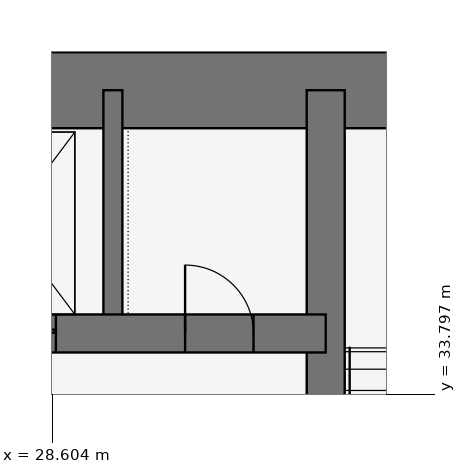
"""IFC4 building model, lengths in metres.
Left out: names, types, materials, properties, quantities, classifications, styles, units other than length and angle.
Written with IfcOpenShell. Run it as: python <this file> out.ifc"""

import sys

from ifc_helpers import new_model, si_unit, direction, frame, frame_2d, origin, place, context, subcontext, project, spatial, rectangle, extrude, element, fill, save


model = new_model("IFC4")
c1 = context("Model", 3, precision=1e-05, world=origin(), true_north=direction((0.0, 1.0)))
c2 = subcontext(c1, "Body", "Model", "MODEL_VIEW")
j1 = project(units=[si_unit("LENGTHUNIT", "METRE"), si_unit("PLANEANGLEUNIT", "RADIAN")], contexts=[c1])
p1 = place(None, origin())
s1 = spatial("IfcSite", under=j1, at=p1, CompositionType="ELEMENT")
p2 = place(p1, origin())
s2 = spatial("IfcBuilding", under=s1, at=p2, CompositionType="ELEMENT")
p3 = place(p2, frame((0.0, 0.0, 15.0)))
s3 = spatial("IfcBuildingStorey", under=s2, at=p3, CompositionType="ELEMENT", Elevation=15.0)
p4 = place(p3, frame((37.8, 37.8, 0.0), z_axis=(0.0, 0.0, 1.0), x_axis=(-1.0, 0.0, 0.0)))
e1 = element("IfcWall", 1, at=p4, inside=s3, PredefinedType="SHEAR", context=c2, shape_type="SweptSolid", body=[
    extrude(rectangle(XDim=17.3, YDim=1.0, at=frame_2d((8.65, 0.0))), origin(), (0.0, 0.0, 1.0), 4.5),
])
p5 = place(p3, frame((21.0, 34.6, 0.0), z_axis=(0.0, 0.0, 1.0), x_axis=(1.0, 0.0, 0.0)))
e2 = element("IfcWall", 2, at=p5, inside=s3, PredefinedType="SHEAR", context=c2, shape_type="SweptSolid", body=[
    extrude(rectangle(XDim=11.2, YDim=0.5, at=frame_2d((5.6, 0.0))), origin(), (0.0, 0.0, 1.0), 4.5),
])
p6 = place(p5, frame((9.35, 0.0, 0.0)))
e3 = element("IfcOpeningElement", 3, at=p6, cuts=e2, PredefinedType="OPENING", context=c2, shape_type="SweptSolid", body=[
    extrude(rectangle(XDim=0.9, YDim=2.1, at=frame_2d((0.45, 1.05))), frame((0.0, 0.26, 0.0), z_axis=(0.0, -1.0, 0.0), x_axis=(1.0, 0.0, 0.0)), (0.0, 0.0, 1.0), 0.52),
])
p7 = place(p5, frame((1.0, 0.0, 0.0)))
e4 = element("IfcOpeningElement", 4, at=p7, cuts=e2, PredefinedType="OPENING", context=c2, shape_type="SweptSolid", body=[
    extrude(rectangle(XDim=1.1, YDim=2.1, at=frame_2d((0.55, 1.05))), frame((0.0, 0.26, 0.0), z_axis=(0.0, -1.0, 0.0), x_axis=(1.0, 0.0, 0.0)), (0.0, 0.0, 1.0), 0.52),
])
p8 = place(p5, frame((3.65, 0.0, 0.0)))
e5 = element("IfcOpeningElement", 5, at=p8, cuts=e2, PredefinedType="OPENING", context=c2, shape_type="SweptSolid", body=[
    extrude(rectangle(XDim=1.1, YDim=2.1, at=frame_2d((0.55, 1.05))), frame((0.0, 0.26, 0.0), z_axis=(0.0, -1.0, 0.0), x_axis=(1.0, 0.0, 0.0)), (0.0, 0.0, 1.0), 0.52),
])
p9 = place(p5, frame((6.35, 0.0, 0.0)))
e6 = element("IfcOpeningElement", 6, at=p9, cuts=e2, PredefinedType="OPENING", context=c2, shape_type="SweptSolid", body=[
    extrude(rectangle(XDim=1.3, YDim=2.1, at=frame_2d((0.65, 1.05))), frame((0.0, 0.26, 0.0), z_axis=(0.0, -1.0, 0.0), x_axis=(1.0, 0.0, 0.0)), (0.0, 0.0, 1.0), 0.52),
])
p10 = place(p3, frame((32.2, 29.15, 0.0), z_axis=(0.0, 0.0, 1.0), x_axis=(0.0, 1.0, 0.0)))
e7 = element("IfcWall", 7, at=p10, inside=s3, PredefinedType="SHEAR", context=c2, shape_type="SweptSolid", body=[
    extrude(rectangle(XDim=8.65, YDim=0.5, at=frame_2d((4.325, 0.0))), origin(), (0.0, 0.0, 1.0), 4.5),
])
p11 = place(p3, frame((29.4, 34.6, 0.0), z_axis=(0.0, 0.0, 1.0), x_axis=(0.0, 1.0, 0.0)))
e8 = element("IfcWall", 8, at=p11, inside=s3, PredefinedType="SHEAR", context=c2, shape_type="SweptSolid", body=[
    extrude(rectangle(XDim=3.2, YDim=0.25, at=frame_2d((1.6, 0.0))), origin(), (0.0, 0.0, 1.0), 4.5),
])
p12 = place(p6, origin())
e9 = element("IfcDoor", 9, at=p12, inside=s3, OperationType="SINGLE_SWING_LEFT", PredefinedType="DOOR", context=c2, shape_type="SweptSolid", body=[
    extrude(rectangle(XDim=0.9, YDim=2.1, at=frame_2d((0.45, 1.05))), frame((0.0, 0.025, 0.0), z_axis=(0.0, -1.0, 0.0), x_axis=(1.0, 0.0, 0.0)), (0.0, 0.0, 1.0), 0.05),
])
fill(e3, e9)
p13 = place(p9, origin())
e10 = element("IfcDoor", 10, at=p13, inside=s3, OperationType="DOUBLE_DOOR_SLIDING", PredefinedType="DOOR", context=c2, shape_type="SweptSolid", body=[
    extrude(rectangle(XDim=1.3, YDim=2.1, at=frame_2d((0.65, 1.05))), frame((0.0, 0.025, 0.0), z_axis=(0.0, -1.0, 0.0), x_axis=(1.0, 0.0, 0.0)), (0.0, 0.0, 1.0), 0.05),
])
fill(e6, e10)
save(model, sys.argv[1])
